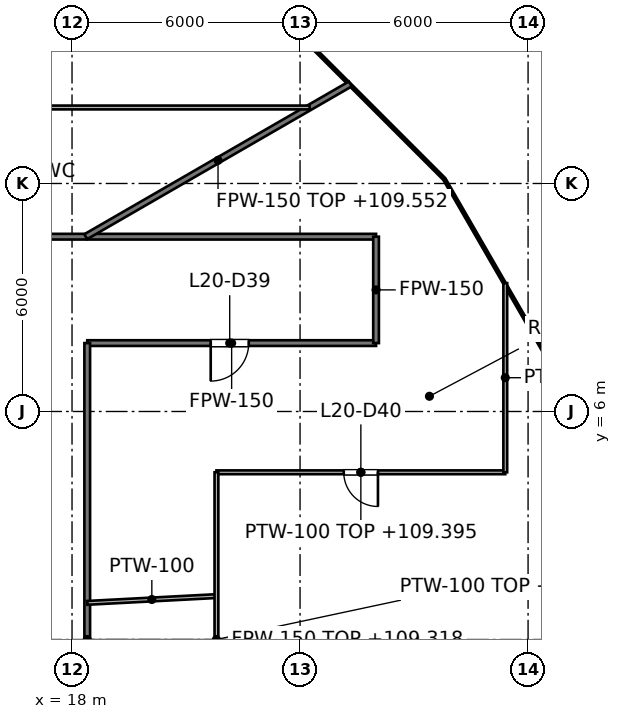
"""IFC4 building model, lengths in metres.
Left out: names, types, materials, properties, quantities, classifications, styles, units other than length and angle.
Written with IfcOpenShell. Run it as: python <this file> out.ifc"""

import sys

from ifc_helpers import new_model, si_unit, direction, frame, frame_2d, origin, place, context, subcontext, project, spatial, rectangle, extrude, element, fill, save


model = new_model("IFC4")
c1 = context("Model", 3, precision=1e-05, world=origin(), true_north=direction((0.0, 1.0)))
c2 = subcontext(c1, "Body", "Model", "MODEL_VIEW")
j1 = project(units=[si_unit("LENGTHUNIT", "METRE"), si_unit("PLANEANGLEUNIT", "RADIAN")], contexts=[c1])
p1 = place(None, origin())
s1 = spatial("IfcSite", under=j1, at=p1, CompositionType="ELEMENT")
p2 = place(p1, origin())
s2 = spatial("IfcBuilding", under=s1, at=p2, CompositionType="ELEMENT")
p3 = place(p2, frame((0.0, 0.0, 106.2)))
s3 = spatial("IfcBuildingStorey", under=s2, at=p3, CompositionType="ELEMENT", Elevation=106.2)
p4 = place(p3, frame((18.4, 7.8, 0.0), z_axis=(0.0, 0.0, 1.0), x_axis=(1.0, 0.0, 0.0)))
e1 = element("IfcWall", 1, at=p4, inside=s3, PredefinedType="PARTITIONING", context=c2, shape_type="SweptSolid", body=[
    extrude(rectangle(XDim=7.6, YDim=0.15, at=frame_2d((3.8, 0.0))), origin(), (0.0, 0.0, 1.0), 3.276),
])
p5 = place(p4, frame((3.249, 0.0, 0.0)))
e2 = element("IfcOpeningElement", 2, at=p5, cuts=e1, PredefinedType="OPENING", context=c2, shape_type="SweptSolid", body=[
    extrude(rectangle(XDim=1.0, YDim=2.1, at=frame_2d((0.5, 1.05))), frame((0.0, 0.075, 0.0), z_axis=(0.0, -1.0, 0.0), x_axis=(1.0, 0.0, 0.0)), (0.0, 0.0, 1.0), 0.15),
])
p6 = place(p3, frame((-26.0, 10.6, 0.0), z_axis=(0.0, 0.0, 1.0), x_axis=(1.0, 0.0, 0.0)))
e3 = element("IfcWall", 3, at=p6, inside=s3, PredefinedType="PARTITIONING", context=c2, shape_type="SweptSolid", body=[
    extrude(rectangle(XDim=52.0, YDim=0.15, at=frame_2d((26.0, 0.0))), origin(), (0.0, 0.0, 1.0), 3.118),
])
p7 = place(p6, frame((40.753, 0.0, 0.0)))
e4 = element("IfcOpeningElement", 4, at=p7, cuts=e3, PredefinedType="OPENING", context=c2, shape_type="SweptSolid", body=[
    extrude(rectangle(XDim=1.0, YDim=2.1, at=frame_2d((0.5, 1.05))), frame((0.0, 0.075, 0.0), z_axis=(0.0, -1.0, 0.0), x_axis=(1.0, 0.0, 0.0)), (0.0, 0.0, 1.0), 0.15),
])
p8 = place(p6, frame((31.36, 0.0, 0.0)))
e5 = element("IfcOpeningElement", 5, at=p8, cuts=e3, PredefinedType="OPENING", context=c2, shape_type="SweptSolid", body=[
    extrude(rectangle(XDim=1.0, YDim=2.1, at=frame_2d((0.5, 1.05))), frame((0.0, 0.075, 0.0), z_axis=(0.0, -1.0, 0.0), x_axis=(1.0, 0.0, 0.0)), (0.0, 0.0, 1.0), 0.15),
])
p9 = place(p6, frame((23.878, 0.0, 0.0)))
e6 = element("IfcOpeningElement", 6, at=p9, cuts=e3, PredefinedType="OPENING", context=c2, shape_type="SweptSolid", body=[
    extrude(rectangle(XDim=1.0, YDim=2.1, at=frame_2d((0.5, 1.05))), frame((0.0, 0.075, 0.0), z_axis=(0.0, -1.0, 0.0), x_axis=(1.0, 0.0, 0.0)), (0.0, 0.0, 1.0), 0.15),
])
p10 = place(p6, frame((20.638, 0.0, 0.0)))
e7 = element("IfcOpeningElement", 7, at=p10, cuts=e3, PredefinedType="OPENING", context=c2, shape_type="SweptSolid", body=[
    extrude(rectangle(XDim=1.0, YDim=2.1, at=frame_2d((0.5, 1.05))), frame((0.0, 0.075, 0.0), z_axis=(0.0, -1.0, 0.0), x_axis=(1.0, 0.0, 0.0)), (0.0, 0.0, 1.0), 0.15),
])
p11 = place(p6, frame((12.808, 0.0, 0.0)))
e8 = element("IfcOpeningElement", 8, at=p11, cuts=e3, PredefinedType="OPENING", context=c2, shape_type="SweptSolid", body=[
    extrude(rectangle(XDim=1.0, YDim=2.1, at=frame_2d((0.5, 1.05))), frame((0.0, 0.075, 0.0), z_axis=(0.0, -1.0, 0.0), x_axis=(1.0, 0.0, 0.0)), (0.0, 0.0, 1.0), 0.15),
])
p12 = place(p3, frame((18.361, 10.6, 0.0), z_axis=(0.0, 0.0, 1.0), x_axis=(0.866017655369, 0.500013420409, 0.0)))
e9 = element("IfcWall", 9, at=p12, inside=s3, PredefinedType="PARTITIONING", context=c2, shape_type="SweptSolid", body=[
    extrude(rectangle(XDim=8.038, YDim=0.15, at=frame_2d((4.019, 0.0))), origin(), (0.0, 0.0, 1.0), 3.352),
])
p13 = place(p3, frame((26.0, 7.8, 0.0), z_axis=(0.0, 0.0, 1.0), x_axis=(0.0, 1.0, 0.0)))
e10 = element("IfcWall", 10, at=p13, inside=s3, PredefinedType="PARTITIONING", context=c2, shape_type="SweptSolid", body=[
    extrude(rectangle(XDim=2.8, YDim=0.15, at=frame_2d((1.4, 0.0))), origin(), (0.0, 0.0, 1.0), 3.276),
])
p14 = place(p3, frame((18.4, -7.8, 0.0), z_axis=(0.0, 0.0, 1.0), x_axis=(0.0, 1.0, 0.0)))
e11 = element("IfcWall", 11, at=p14, inside=s3, PredefinedType="PARTITIONING", context=c2, shape_type="SweptSolid", body=[
    extrude(rectangle(XDim=15.6, YDim=0.15, at=frame_2d((7.8, 0.0))), origin(), (0.0, 0.0, 1.0), 3.118),
])
p15 = place(p14, frame((5.317, 0.0, 0.0)))
e12 = element("IfcOpeningElement", 12, at=p15, cuts=e11, PredefinedType="OPENING", context=c2, shape_type="SweptSolid", body=[
    extrude(rectangle(XDim=1.0, YDim=2.1, at=frame_2d((0.5, 1.05))), frame((0.0, 0.075, 0.0), z_axis=(0.0, -1.0, 0.0), x_axis=(1.0, 0.0, 0.0)), (0.0, 0.0, 1.0), 0.15),
])
p16 = place(p3, frame((21.8, 4.4, 0.0), z_axis=(0.0, 0.0, 1.0), x_axis=(1.0, 0.0, 0.0)))
e13 = element("IfcWall", 13, at=p16, inside=s3, PredefinedType="PARTITIONING", context=c2, shape_type="SweptSolid", body=[
    extrude(rectangle(XDim=7.6, YDim=0.1, at=frame_2d((3.8, 0.0))), origin(), (0.0, 0.0, 1.0), 3.195),
])
p17 = place(p16, frame((3.35, 0.0, 0.0)))
e14 = element("IfcOpeningElement", 14, at=p17, cuts=e13, PredefinedType="OPENING", context=c2, shape_type="SweptSolid", body=[
    extrude(rectangle(XDim=0.9, YDim=2.1, at=frame_2d((0.45, 1.05))), frame((0.0, 0.05, 0.0), z_axis=(0.0, -1.0, 0.0), x_axis=(1.0, 0.0, 0.0)), (0.0, 0.0, 1.0), 0.1),
])
p18 = place(p3, frame((-24.25, 14.0, 0.0), z_axis=(0.0, 0.0, 1.0), x_axis=(1.0, 0.0, 0.0)))
e15 = element("IfcWall", 15, at=p18, inside=s3, PredefinedType="PARTITIONING", context=c2, shape_type="SweptSolid", body=[
    extrude(rectangle(XDim=48.5, YDim=0.1, at=frame_2d((24.25, 0.0))), origin(), (0.0, 0.0, 1.0), 3.118),
])
p19 = place(p18, frame((31.105, 0.0, 0.0)))
e16 = element("IfcOpeningElement", 16, at=p19, cuts=e15, PredefinedType="OPENING", context=c2, shape_type="SweptSolid", body=[
    extrude(rectangle(XDim=1.8, YDim=2.1, at=frame_2d((0.9, 1.05))), frame((0.0, 0.05, 0.0), z_axis=(0.0, -1.0, 0.0), x_axis=(1.0, 0.0, 0.0)), (0.0, 0.0, 1.0), 0.1),
])
p20 = place(p18, frame((7.129, 0.0, 0.0)))
e17 = element("IfcOpeningElement", 17, at=p20, cuts=e15, PredefinedType="OPENING", context=c2, shape_type="SweptSolid", body=[
    extrude(rectangle(XDim=0.9, YDim=2.1, at=frame_2d((0.45, 1.05))), frame((0.0, 0.05, 0.0), z_axis=(0.0, -1.0, 0.0), x_axis=(1.0, 0.0, 0.0)), (0.0, 0.0, 1.0), 0.1),
])
p21 = place(p3, frame((18.4, 0.964, 0.0), z_axis=(0.0, 0.0, 1.0), x_axis=(0.998632842418, 0.052272804058, 0.0)))
e18 = element("IfcWall", 18, at=p21, inside=s3, PredefinedType="PARTITIONING", context=c2, shape_type="SweptSolid", body=[
    extrude(rectangle(XDim=3.405, YDim=0.1, at=frame_2d((1.702, 0.0))), origin(), (0.0, 0.0, 1.0), 4.05),
])
p22 = place(p3, frame((29.4, 4.4, 0.0), z_axis=(0.0, 0.0, 1.0), x_axis=(0.0, 1.0, 0.0)))
e19 = element("IfcWall", 19, at=p22, inside=s3, PredefinedType="PARTITIONING", context=c2, shape_type="SweptSolid", body=[
    extrude(rectangle(XDim=4.978, YDim=0.1, at=frame_2d((2.489, 0.0))), origin(), (0.0, 0.0, 1.0), 3.127),
])
p23 = place(p3, frame((21.8, -4.4, 0.0), z_axis=(0.0, 0.0, 1.0), x_axis=(0.0, 1.0, 0.0)))
e20 = element("IfcWall", 20, at=p23, inside=s3, PredefinedType="PARTITIONING", context=c2, shape_type="SweptSolid", body=[
    extrude(rectangle(XDim=8.8, YDim=0.1, at=frame_2d((4.4, 0.0))), origin(), (0.0, 0.0, 1.0), 3.118),
])
p24 = place(p5, origin())
e21 = element("IfcDoor", 21, at=p24, inside=s3, OperationType="SINGLE_SWING_LEFT", PredefinedType="DOOR", context=c2, shape_type="SweptSolid", body=[
    extrude(rectangle(XDim=1.0, YDim=2.1, at=frame_2d((0.5, 1.05))), frame((0.0, 0.025, 0.0), z_axis=(0.0, -1.0, 0.0), x_axis=(1.0, 0.0, 0.0)), (0.0, 0.0, 1.0), 0.05),
])
fill(e2, e21)
p25 = place(p17, origin())
e22 = element("IfcDoor", 22, at=p25, inside=s3, OperationType="SINGLE_SWING_RIGHT", PredefinedType="DOOR", context=c2, shape_type="SweptSolid", body=[
    extrude(rectangle(XDim=0.9, YDim=2.1, at=frame_2d((0.45, 1.05))), frame((0.0, 0.025, 0.0), z_axis=(0.0, -1.0, 0.0), x_axis=(1.0, 0.0, 0.0)), (0.0, 0.0, 1.0), 0.05),
])
fill(e14, e22)
save(model, sys.argv[1])
